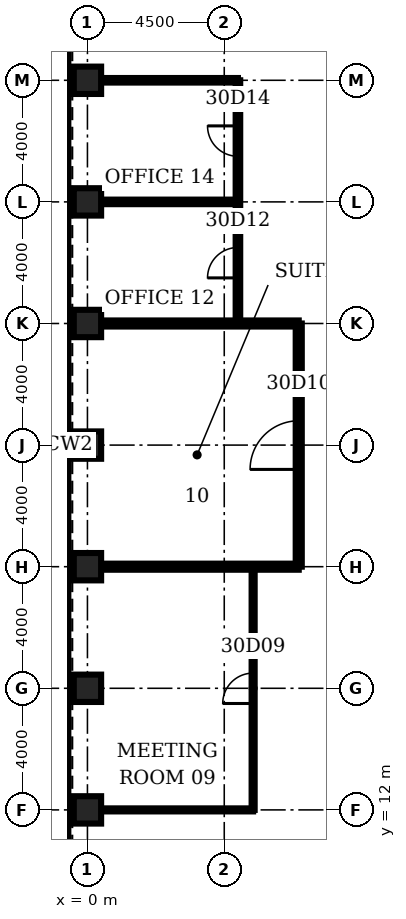
"""IFC4 building model, lengths in metres.
Left out: names, types, materials, properties, quantities, classifications, styles, units other than length and angle.
Written with IfcOpenShell. Run it as: python <this file> out.ifc"""

import sys

from ifc_helpers import new_model, si_unit, direction, frame, frame_2d, origin, origin_2d, place, context, subcontext, project, spatial, rectangle, hollow_rectangle, extrude, element, fill, save


model = new_model("IFC4")
c1 = context("Model", 3, precision=1e-05, world=origin(), true_north=direction((0.0, 1.0)))
c2 = subcontext(c1, "Body", "Model", "MODEL_VIEW")
j1 = project(units=[si_unit("LENGTHUNIT", "METRE"), si_unit("PLANEANGLEUNIT", "RADIAN")], contexts=[c1])
p1 = place(None, origin())
s1 = spatial("IfcSite", under=j1, at=p1, CompositionType="ELEMENT")
p2 = place(p1, origin())
s2 = spatial("IfcBuilding", under=s1, at=p2, CompositionType="ELEMENT")
p3 = place(p2, frame((0.0, 0.0, 138.3)))
s3 = spatial("IfcBuildingStorey", under=s2, at=p3, CompositionType="ELEMENT", Elevation=138.3)
for number, where, z_axis, x_axis in (
    (1, (0.0, 36.0, 0.0), (0.0, 0.0, 1.0), (1.0, 0.0, 0.0)),
    (2, (0.0, 32.0, 0.0), (0.0, 0.0, 1.0), (1.0, 0.0, 0.0)),
    (3, (0.0, 28.0, 0.0), (0.0, 0.0, 1.0), (1.0, 0.0, 0.0)),
    (4, (0.0, 24.0, 0.0), (0.0, 0.0, 1.0), (1.0, 0.0, 0.0)),
    (5, (0.0, 20.0, 0.0), (0.0, 0.0, 1.0), (1.0, 0.0, 0.0)),
    (6, (0.0, 16.0, 0.0), (0.0, 0.0, 1.0), (1.0, 0.0, 0.0)),
    (7, (0.0, 12.0, 0.0), (0.0, 0.0, 1.0), (1.0, 0.0, 0.0)),
):
    element("IfcColumn", number, at=place(p3, frame(where, z_axis=z_axis, x_axis=x_axis)), inside=s3, PredefinedType="COLUMN", context=c2, shape_type="SweptSolid", body=[
        extrude(hollow_rectangle(XDim=0.9, YDim=0.9, WallThickness=0.1, at=origin_2d()), origin(), (0.0, 0.0, 1.0), 4.2),
    ])
p4 = place(p3, frame((0.45, 12.0, 0.0), z_axis=(0.0, 0.0, 1.0), x_axis=(1.0, 0.0, 0.0)))
e8 = element("IfcWall", 8, at=p4, inside=s3, PredefinedType="PARTITIONING", context=c2, shape_type="SweptSolid", body=[
    extrude(rectangle(XDim=5.0, YDim=0.1, at=frame_2d((2.5, 0.0))), origin(), (0.0, 0.0, 1.0), 3.0),
])
for number, where, z_axis, x_axis in (
    (9, (0.45, 20.0, 0.0), (0.0, 0.0, 1.0), (1.0, 0.0, 0.0)),
    (10, (0.45, 28.0, 0.0), (0.0, 0.0, 1.0), (1.0, 0.0, 0.0)),
):
    element("IfcWall", number, at=place(p3, frame(where, z_axis=z_axis, x_axis=x_axis)), inside=s3, PredefinedType="PARTITIONING", context=c2, shape_type="SweptSolid", body=[
        extrude(rectangle(XDim=6.5, YDim=0.2, at=frame_2d((3.25, 0.0))), origin(), (0.0, 0.0, 1.0), 3.0),
    ])
for number, where, z_axis, x_axis in (
    (11, (0.45, 32.0, 0.0), (0.0, 0.0, 1.0), (1.0, 0.0, 0.0)),
    (12, (0.45, 36.0, 0.0), (0.0, 0.0, 1.0), (1.0, 0.0, 0.0)),
):
    element("IfcWall", number, at=place(p3, frame(where, z_axis=z_axis, x_axis=x_axis)), inside=s3, PredefinedType="PARTITIONING", context=c2, shape_type="SweptSolid", body=[
        extrude(rectangle(XDim=4.5, YDim=0.15, at=frame_2d((2.25, 0.0))), origin(), (0.0, 0.0, 1.0), 3.0),
    ])
p5 = place(p3, frame((4.95, 28.0, 0.0), z_axis=(0.0, 0.0, 1.0), x_axis=(0.0, 1.0, 0.0)))
e13 = element("IfcWall", 13, at=p5, inside=s3, PredefinedType="PARTITIONING", context=c2, shape_type="SweptSolid", body=[
    extrude(rectangle(XDim=8.0, YDim=0.15, at=frame_2d((4.0, 0.0))), origin(), (0.0, 0.0, 1.0), 3.0),
])
p6 = place(p5, frame((1.5, 0.0, 0.0)))
e14 = element("IfcOpeningElement", 14, at=p6, cuts=e13, PredefinedType="OPENING", context=c2, shape_type="SweptSolid", body=[
    extrude(rectangle(XDim=1.0, YDim=2.1, at=frame_2d((0.5, 1.05))), frame((0.0, 0.085, 0.0), z_axis=(0.0, -1.0, 0.0), x_axis=(1.0, 0.0, 0.0)), (0.0, 0.0, 1.0), 0.17),
])
p7 = place(p5, frame((5.5, 0.0, 0.0)))
e15 = element("IfcOpeningElement", 15, at=p7, cuts=e13, PredefinedType="OPENING", context=c2, shape_type="SweptSolid", body=[
    extrude(rectangle(XDim=1.0, YDim=2.1, at=frame_2d((0.5, 1.05))), frame((0.0, 0.085, 0.0), z_axis=(0.0, -1.0, 0.0), x_axis=(1.0, 0.0, 0.0)), (0.0, 0.0, 1.0), 0.17),
])
p8 = place(p3, frame((5.45, 12.0, 0.0), z_axis=(0.0, 0.0, 1.0), x_axis=(0.0, 1.0, 0.0)))
e16 = element("IfcWall", 16, at=p8, inside=s3, PredefinedType="PARTITIONING", context=c2, shape_type="SweptSolid", body=[
    extrude(rectangle(XDim=8.0, YDim=0.1, at=frame_2d((4.0, 0.0))), origin(), (0.0, 0.0, 1.0), 3.0),
])
p9 = place(p8, frame((3.5, 0.0, 0.0)))
e17 = element("IfcOpeningElement", 17, at=p9, cuts=e16, PredefinedType="OPENING", context=c2, shape_type="SweptSolid", body=[
    extrude(rectangle(XDim=1.0, YDim=2.1, at=frame_2d((0.5, 1.05))), frame((0.0, 0.06, 0.0), z_axis=(0.0, -1.0, 0.0), x_axis=(1.0, 0.0, 0.0)), (0.0, 0.0, 1.0), 0.12),
])
p10 = place(p3, frame((6.95, 20.0, 0.0), z_axis=(0.0, 0.0, 1.0), x_axis=(0.0, 1.0, 0.0)))
e18 = element("IfcWall", 18, at=p10, inside=s3, PredefinedType="PARTITIONING", context=c2, shape_type="SweptSolid", body=[
    extrude(rectangle(XDim=8.0, YDim=0.2, at=frame_2d((4.0, 0.0))), origin(), (0.0, 0.0, 1.0), 3.0),
])
p11 = place(p10, frame((3.2, 0.0, 0.0)))
e19 = element("IfcOpeningElement", 19, at=p11, cuts=e18, PredefinedType="OPENING", context=c2, shape_type="SweptSolid", body=[
    extrude(rectangle(XDim=1.6, YDim=2.1, at=frame_2d((0.8, 1.05))), frame((0.0, 0.11, 0.0), z_axis=(0.0, -1.0, 0.0), x_axis=(1.0, 0.0, 0.0)), (0.0, 0.0, 1.0), 0.22),
])
p12 = place(p9, origin())
e20 = element("IfcDoor", 20, at=p12, inside=s3, OperationType="SINGLE_SWING_LEFT", PredefinedType="DOOR", context=c2, shape_type="SweptSolid", body=[
    extrude(rectangle(XDim=1.0, YDim=2.1, at=frame_2d((0.5, 1.05))), frame((0.0, 0.025, 0.0), z_axis=(0.0, -1.0, 0.0), x_axis=(1.0, 0.0, 0.0)), (0.0, 0.0, 1.0), 0.05),
])
fill(e17, e20)
p13 = place(p11, origin())
e21 = element("IfcDoor", 21, at=p13, inside=s3, OperationType="SINGLE_SWING_LEFT", PredefinedType="DOOR", context=c2, shape_type="SweptSolid", body=[
    extrude(rectangle(XDim=1.6, YDim=2.1, at=frame_2d((0.8, 1.05))), frame((0.0, 0.025, 0.0), z_axis=(0.0, -1.0, 0.0), x_axis=(1.0, 0.0, 0.0)), (0.0, 0.0, 1.0), 0.05),
])
fill(e19, e21)
p14 = place(p6, origin())
e22 = element("IfcDoor", 22, at=p14, inside=s3, OperationType="SINGLE_SWING_LEFT", PredefinedType="DOOR", context=c2, shape_type="SweptSolid", body=[
    extrude(rectangle(XDim=1.0, YDim=2.1, at=frame_2d((0.5, 1.05))), frame((0.0, 0.025, 0.0), z_axis=(0.0, -1.0, 0.0), x_axis=(1.0, 0.0, 0.0)), (0.0, 0.0, 1.0), 0.05),
])
fill(e14, e22)
p15 = place(p7, origin())
e23 = element("IfcDoor", 23, at=p15, inside=s3, OperationType="SINGLE_SWING_RIGHT", PredefinedType="DOOR", context=c2, shape_type="SweptSolid", body=[
    extrude(rectangle(XDim=1.0, YDim=2.1, at=frame_2d((0.5, 1.05))), frame((0.0, 0.025, 0.0), z_axis=(0.0, -1.0, 0.0), x_axis=(1.0, 0.0, 0.0)), (0.0, 0.0, 1.0), 0.05),
])
fill(e15, e23)
save(model, sys.argv[1])
